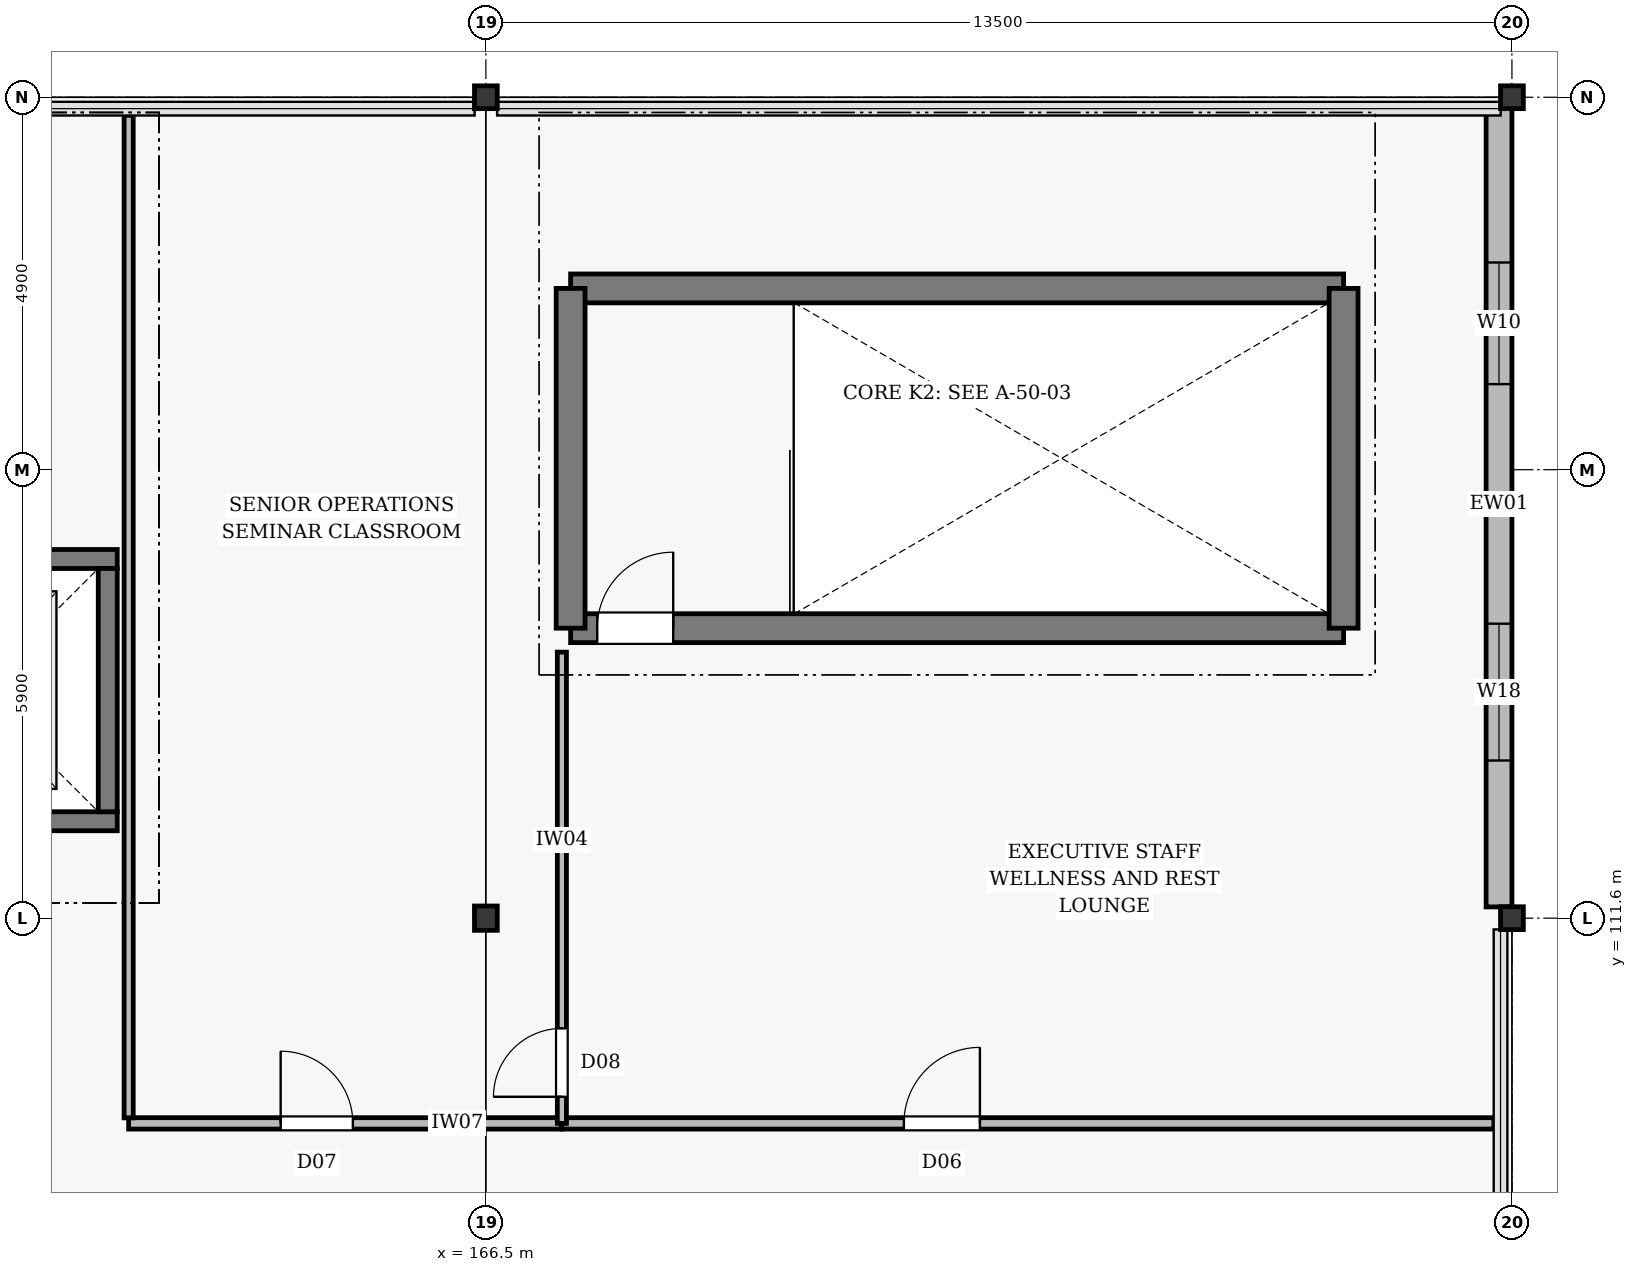
"""IFC4 building model, lengths in metres.
Left out: names, types, materials, properties, quantities, classifications, styles, units other than length and angle.
Written with IfcOpenShell. Run it as: python <this file> out.ifc"""

import sys

from ifc_helpers import new_model, si_unit, direction, frame, frame_2d, origin, origin_2d, place, context, subcontext, project, spatial, rectangle, i_section, extrude, element, fill, save


model = new_model("IFC4")
c1 = context("Model", 3, precision=1e-05, world=origin(), true_north=direction((0.0, 1.0)))
c2 = subcontext(c1, "Body", "Model", "MODEL_VIEW")
j1 = project(units=[si_unit("LENGTHUNIT", "METRE"), si_unit("PLANEANGLEUNIT", "RADIAN")], contexts=[c1])
p1 = place(None, origin())
s1 = spatial("IfcSite", under=j1, at=p1, CompositionType="ELEMENT")
p2 = place(p1, origin())
s2 = spatial("IfcBuilding", under=s1, at=p2, CompositionType="ELEMENT")
p3 = place(p2, frame((0.0, 0.0, 25.2)))
s3 = spatial("IfcBuildingStorey", under=s2, at=p3, CompositionType="ELEMENT", Elevation=25.2)
p4 = place(p3, frame((166.5, 111.6, 0.0), z_axis=(0.0, 0.0, 1.0), x_axis=(1.0, 0.0, 0.0)))
e1 = element("IfcColumn", 1, at=p4, inside=s3, PredefinedType="COLUMN", context=c2, shape_type="SweptSolid", body=[
    extrude(i_section(OverallWidth=0.3, OverallDepth=0.32, WebThickness=0.011, FlangeThickness=0.021, at=origin_2d()), origin(), (0.0, 0.0, 1.0), 5.4),
])
for number, where, z_axis, x_axis in (
    (2, (166.5, 122.4, 0.0), (0.0, 0.0, 1.0), (1.0, 0.0, 0.0)),
    (3, (180.0, 111.6, 0.0), (0.0, 0.0, 1.0), (1.0, 0.0, 0.0)),
    (4, (180.0, 122.4, 0.0), (0.0, 0.0, 1.0), (1.0, 0.0, 0.0)),
):
    element("IfcColumn", number, at=place(p3, frame(where, z_axis=z_axis, x_axis=x_axis)), inside=s3, PredefinedType="COLUMN", context=c2, shape_type="SweptSolid", body=[
        extrude(i_section(OverallWidth=0.3, OverallDepth=0.3, WebThickness=0.011, FlangeThickness=0.019, at=origin_2d()), origin(), (0.0, 0.0, 1.0), 5.4),
    ])
p5 = place(p3, frame((179.83, 122.252, 0.0), z_axis=(0.0, 0.0, 1.0), x_axis=(0.0, -1.0, 0.0)))
e5 = element("IfcWall", 5, at=p5, inside=s3, PredefinedType="STANDARD", context=c2, shape_type="SweptSolid", body=[
    extrude(rectangle(XDim=10.504, YDim=0.34, at=frame_2d((5.252, 0.0))), origin(), (0.0, 0.0, 1.0), 4.65),
])
p6 = place(p5, frame((2.026, 0.0, 0.75)))
e6 = element("IfcOpeningElement", 6, at=p6, cuts=e5, PredefinedType="OPENING", context=c2, shape_type="SweptSolid", body=[
    extrude(rectangle(XDim=1.6, YDim=2.1, at=frame_2d((0.8, 1.05))), frame((0.0, 0.182, 0.0), z_axis=(0.0, -1.0, 0.0), x_axis=(1.0, 0.0, 0.0)), (0.0, 0.0, 1.0), 0.364),
])
p7 = place(p5, frame((6.778, 0.0, 1.05)))
e7 = element("IfcOpeningElement", 7, at=p7, cuts=e5, PredefinedType="OPENING", context=c2, shape_type="SweptSolid", body=[
    extrude(rectangle(XDim=1.8, YDim=1.1, at=frame_2d((0.9, 0.55))), frame((0.0, 0.182, 0.0), z_axis=(0.0, -1.0, 0.0), x_axis=(1.0, 0.0, 0.0)), (0.0, 0.0, 1.0), 0.364),
])
p8 = place(p3, frame((167.615, 115.415, 0.0), z_axis=(0.0, 0.0, 1.0), x_axis=(1.0, 0.0, 0.0)))
e8 = element("IfcWall", 8, at=p8, inside=s3, PredefinedType="SOLIDWALL", context=c2, shape_type="SweptSolid", body=[
    extrude(rectangle(XDim=10.17, YDim=0.38, at=frame_2d((5.085, 0.0))), origin(), (0.0, 0.0, 1.0), 5.2),
])
p9 = place(p8, frame((0.35, 0.0, 0.005)))
e9 = element("IfcOpeningElement", 9, at=p9, cuts=e8, PredefinedType="OPENING", context=c2, shape_type="SweptSolid", body=[
    extrude(rectangle(XDim=1.0, YDim=2.15, at=frame_2d((0.5, 1.075))), frame((0.0, 0.202, 0.0), z_axis=(0.0, -1.0, 0.0), x_axis=(1.0, 0.0, 0.0)), (0.0, 0.0, 1.0), 0.404),
])
p10 = place(p3, frame((167.615, 119.885, 0.0), z_axis=(0.0, 0.0, 1.0), x_axis=(1.0, 0.0, 0.0)))
e10 = element("IfcWall", 10, at=p10, inside=s3, PredefinedType="SOLIDWALL", context=c2, shape_type="SweptSolid", body=[
    extrude(rectangle(XDim=10.17, YDim=0.38, at=frame_2d((5.085, 0.0))), origin(), (0.0, 0.0, 1.0), 5.2),
])
for number, where, z_axis, x_axis in (
    (11, (167.615, 115.415, 0.0), (0.0, 0.0, 1.0), (0.0, 1.0, 0.0)),
    (12, (177.785, 115.415, 0.0), (0.0, 0.0, 1.0), (0.0, 1.0, 0.0)),
):
    element("IfcWall", number, at=place(p3, frame(where, z_axis=z_axis, x_axis=x_axis)), inside=s3, PredefinedType="SOLIDWALL", context=c2, shape_type="SweptSolid", body=[
        extrude(rectangle(XDim=4.47, YDim=0.38, at=frame_2d((2.235, 0.0))), origin(), (0.0, 0.0, 1.0), 5.2),
    ])
p11 = place(p3, frame((157.95, 112.875, 0.0), z_axis=(0.0, 0.0, 1.0), x_axis=(1.0, 0.0, 0.0)))
e13 = element("IfcWall", 13, at=p11, inside=s3, PredefinedType="SOLIDWALL", context=c2, shape_type="SweptSolid", body=[
    extrude(rectangle(XDim=3.7, YDim=0.25, at=frame_2d((1.85, 0.0))), origin(), (0.0, 0.0, 1.0), 5.2),
])
p12 = place(p11, frame((1.225, 0.0, 0.005)))
e14 = element("IfcOpeningElement", 14, at=p12, cuts=e13, PredefinedType="OPENING", context=c2, shape_type="SweptSolid", body=[
    extrude(rectangle(XDim=1.25, YDim=2.2, at=frame_2d((0.625, 1.1))), frame((0.0, 0.137, 0.0), z_axis=(0.0, -1.0, 0.0), x_axis=(1.0, 0.0, 0.0)), (0.0, 0.0, 1.0), 0.274),
])
p13 = place(p3, frame((157.95, 116.325, 0.0), z_axis=(0.0, 0.0, 1.0), x_axis=(1.0, 0.0, 0.0)))
e15 = element("IfcWall", 15, at=p13, inside=s3, PredefinedType="SOLIDWALL", context=c2, shape_type="SweptSolid", body=[
    extrude(rectangle(XDim=3.7, YDim=0.25, at=frame_2d((1.85, 0.0))), origin(), (0.0, 0.0, 1.0), 5.2),
])
p14 = place(p3, frame((161.525, 113.0, 0.0), z_axis=(0.0, 0.0, 1.0), x_axis=(0.0, 1.0, 0.0)))
e16 = element("IfcWall", 16, at=p14, inside=s3, PredefinedType="SOLIDWALL", context=c2, shape_type="SweptSolid", body=[
    extrude(rectangle(XDim=3.2, YDim=0.25, at=frame_2d((1.6, 0.0))), origin(), (0.0, 0.0, 1.0), 5.2),
])
p15 = place(p3, frame((161.8, 108.9, 0.0), z_axis=(0.0, 0.0, 1.0), x_axis=(1.0, 0.0, 0.0)))
e17 = element("IfcWall", 17, at=p15, inside=s3, PredefinedType="PARTITIONING", context=c2, shape_type="SweptSolid", body=[
    extrude(rectangle(XDim=5.7, YDim=0.15, at=frame_2d((2.85, 0.0))), origin(), (0.0, 0.0, 1.0), 4.87),
])
p16 = place(p15, frame((2.0, 0.0, 0.005)))
e18 = element("IfcOpeningElement", 18, at=p16, cuts=e17, PredefinedType="OPENING", context=c2, shape_type="SweptSolid", body=[
    extrude(rectangle(XDim=0.95, YDim=2.1, at=frame_2d((0.475, 1.05))), frame((0.0, 0.087, 0.0), z_axis=(0.0, -1.0, 0.0), x_axis=(1.0, 0.0, 0.0)), (0.0, 0.0, 1.0), 0.174),
])
p17 = place(p3, frame((167.5, 108.9, 0.0), z_axis=(0.0, 0.0, 1.0), x_axis=(1.0, 0.0, 0.0)))
e19 = element("IfcWall", 19, at=p17, inside=s3, PredefinedType="PARTITIONING", context=c2, shape_type="SweptSolid", body=[
    extrude(rectangle(XDim=12.262, YDim=0.15, at=frame_2d((6.131, 0.0))), origin(), (0.0, 0.0, 1.0), 4.87),
])
p18 = place(p17, frame((4.5, 0.0, 0.005)))
e20 = element("IfcOpeningElement", 20, at=p18, cuts=e19, PredefinedType="OPENING", context=c2, shape_type="SweptSolid", body=[
    extrude(rectangle(XDim=1.0, YDim=2.1, at=frame_2d((0.5, 1.05))), frame((0.0, 0.087, 0.0), z_axis=(0.0, -1.0, 0.0), x_axis=(1.0, 0.0, 0.0)), (0.0, 0.0, 1.0), 0.174),
])
p19 = place(p3, frame((167.5, 108.9, 0.0), z_axis=(0.0, 0.0, 1.0), x_axis=(0.0, 1.0, 0.0)))
e21 = element("IfcWall", 21, at=p19, inside=s3, PredefinedType="PARTITIONING", context=c2, shape_type="SweptSolid", body=[
    extrude(rectangle(XDim=6.2, YDim=0.12, at=frame_2d((3.1, 0.0))), origin(), (0.0, 0.0, 1.0), 4.68),
])
p20 = place(p19, frame((0.35, 0.0, 0.005)))
e22 = element("IfcOpeningElement", 22, at=p20, cuts=e21, PredefinedType="OPENING", context=c2, shape_type="SweptSolid", body=[
    extrude(rectangle(XDim=0.9, YDim=2.1, at=frame_2d((0.45, 1.05))), frame((0.0, 0.072, 0.0), z_axis=(0.0, -1.0, 0.0), x_axis=(1.0, 0.0, 0.0)), (0.0, 0.0, 1.0), 0.144),
])
p21 = place(p3, frame((161.8, 108.973, 0.0), z_axis=(0.0, 0.0, 1.0), x_axis=(0.0, 1.0, 0.0)))
e23 = element("IfcWall", 23, at=p21, inside=s3, PredefinedType="PARTITIONING", context=c2, shape_type="SweptSolid", body=[
    extrude(rectangle(XDim=13.189, YDim=0.12, at=frame_2d((6.595, 0.0))), origin(), (0.0, 0.0, 1.0), 4.68),
])
p22 = place(p6, origin())
e24 = element("IfcWindow", 24, at=p22, inside=s3, PartitioningType="DOUBLE_PANEL_VERTICAL", PredefinedType="WINDOW", context=c2, shape_type="SweptSolid", body=[
    extrude(rectangle(XDim=1.6, YDim=2.1, at=frame_2d((0.8, 1.05))), frame((0.0, 0.03, 0.0), z_axis=(0.0, -1.0, 0.0), x_axis=(1.0, 0.0, 0.0)), (0.0, 0.0, 1.0), 0.06),
])
fill(e6, e24)
p23 = place(p7, origin())
e25 = element("IfcWindow", 25, at=p23, inside=s3, PartitioningType="DOUBLE_PANEL_VERTICAL", PredefinedType="WINDOW", context=c2, shape_type="SweptSolid", body=[
    extrude(rectangle(XDim=1.8, YDim=1.1, at=frame_2d((0.9, 0.55))), frame((0.0, 0.03, 0.0), z_axis=(0.0, -1.0, 0.0), x_axis=(1.0, 0.0, 0.0)), (0.0, 0.0, 1.0), 0.06),
])
fill(e7, e25)
p24 = place(p9, origin())
e26 = element("IfcDoor", 26, at=p24, inside=s3, OperationType="SINGLE_SWING_RIGHT", PredefinedType="DOOR", context=c2, shape_type="SweptSolid", body=[
    extrude(rectangle(XDim=1.0, YDim=2.15, at=frame_2d((0.5, 1.075))), frame((0.0, 0.025, 0.0), z_axis=(0.0, -1.0, 0.0), x_axis=(1.0, 0.0, 0.0)), (0.0, 0.0, 1.0), 0.05),
])
fill(e9, e26)
p25 = place(p16, origin())
e27 = element("IfcDoor", 27, at=p25, inside=s3, OperationType="SINGLE_SWING_LEFT", PredefinedType="DOOR", context=c2, shape_type="SweptSolid", body=[
    extrude(rectangle(XDim=0.95, YDim=2.1, at=frame_2d((0.475, 1.05))), frame((0.0, 0.025, 0.0), z_axis=(0.0, -1.0, 0.0), x_axis=(1.0, 0.0, 0.0)), (0.0, 0.0, 1.0), 0.05),
])
fill(e18, e27)
p26 = place(p18, origin())
e28 = element("IfcDoor", 28, at=p26, inside=s3, OperationType="SINGLE_SWING_RIGHT", PredefinedType="DOOR", context=c2, shape_type="SweptSolid", body=[
    extrude(rectangle(XDim=1.0, YDim=2.1, at=frame_2d((0.5, 1.05))), frame((0.0, 0.025, 0.0), z_axis=(0.0, -1.0, 0.0), x_axis=(1.0, 0.0, 0.0)), (0.0, 0.0, 1.0), 0.05),
])
fill(e20, e28)
p27 = place(p20, origin())
e29 = element("IfcDoor", 29, at=p27, inside=s3, OperationType="SINGLE_SWING_LEFT", PredefinedType="DOOR", context=c2, shape_type="SweptSolid", body=[
    extrude(rectangle(XDim=0.9, YDim=2.1, at=frame_2d((0.45, 1.05))), frame((0.0, 0.025, 0.0), z_axis=(0.0, -1.0, 0.0), x_axis=(1.0, 0.0, 0.0)), (0.0, 0.0, 1.0), 0.05),
])
fill(e22, e29)
save(model, sys.argv[1])
